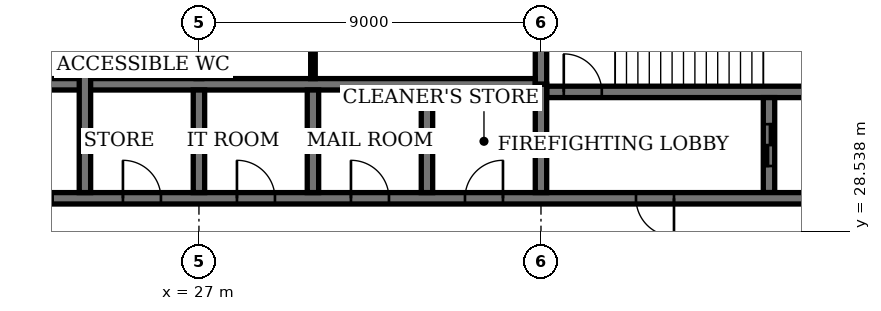
"""IFC4 building model, lengths in metres.
Left out: names, types, materials, properties, quantities, classifications, styles, units other than length and angle.
Written with IfcOpenShell. Run it as: python <this file> out.ifc"""

import sys

from ifc_helpers import new_model, si_unit, direction, frame, frame_2d, origin, place, context, subcontext, project, spatial, rectangle, extrude, element, fill, save


model = new_model("IFC4")
c1 = context("Model", 3, precision=1e-05, world=origin(), true_north=direction((0.0, 1.0)))
c2 = subcontext(c1, "Body", "Model", "MODEL_VIEW")
j1 = project(units=[si_unit("LENGTHUNIT", "METRE"), si_unit("PLANEANGLEUNIT", "RADIAN")], contexts=[c1])
p1 = place(None, origin())
s1 = spatial("IfcSite", under=j1, at=p1, CompositionType="ELEMENT")
p2 = place(p1, origin())
s2 = spatial("IfcBuilding", under=s1, at=p2, CompositionType="ELEMENT")
p3 = place(p2, frame((0.0, 0.0, 243.4)))
s3 = spatial("IfcBuildingStorey", under=s2, at=p3, CompositionType="ELEMENT", Elevation=243.4)
p4 = place(p3, frame((36.15, 32.2, 0.0), z_axis=(0.0, 0.0, 1.0), x_axis=(1.0, 0.0, 0.0)))
e1 = element("IfcWall", 1, at=p4, inside=s3, PredefinedType="SHEAR", context=c2, shape_type="SweptSolid", body=[
    extrude(rectangle(XDim=8.3, YDim=0.3, at=frame_2d((4.15, 0.0))), origin(), (0.0, 0.0, 1.0), 4.0),
])
p5 = place(p4, frame((0.45, 0.0, 0.0)))
e2 = element("IfcOpeningElement", 2, at=p5, cuts=e1, PredefinedType="OPENING", context=c2, shape_type="SweptSolid", body=[
    extrude(rectangle(XDim=1.0, YDim=2.4, at=frame_2d((0.5, 1.2))), frame((0.0, 0.16, 0.0), z_axis=(0.0, -1.0, 0.0), x_axis=(1.0, 0.0, 0.0)), (0.0, 0.0, 1.0), 0.32),
])
p6 = place(p3, frame((36.0, 32.4, 0.0), z_axis=(0.0, 0.0, 1.0), x_axis=(0.0, 1.0, 0.0)))
e3 = element("IfcWall", 3, at=p6, inside=s3, PredefinedType="SHEAR", context=c2, shape_type="SweptSolid", body=[
    extrude(rectangle(XDim=3.05, YDim=0.3, at=frame_2d((1.525, 0.0))), origin(), (0.0, 0.0, 1.0), 4.0),
])
p7 = place(p3, frame((42.0, 29.55, 0.0), z_axis=(0.0, 0.0, 1.0), x_axis=(0.0, 1.0, 0.0)))
e4 = element("IfcWall", 4, at=p7, inside=s3, PredefinedType="SHEAR", context=c2, shape_type="SweptSolid", body=[
    extrude(rectangle(XDim=2.5, YDim=0.3, at=frame_2d((1.25, 0.0))), origin(), (0.0, 0.0, 1.0), 4.0),
])
p8 = place(p7, frame((0.7, 0.0, 0.0)))
e5 = element("IfcOpeningElement", 5, at=p8, cuts=e4, PredefinedType="OPENING", context=c2, shape_type="SweptSolid", body=[
    extrude(rectangle(XDim=1.1, YDim=2.4, at=frame_2d((0.55, 1.2))), frame((0.0, 0.16, 0.0), z_axis=(0.0, -1.0, 0.0), x_axis=(1.0, 0.0, 0.0)), (0.0, 0.0, 1.0), 0.32),
])
p9 = place(p3, frame((18.55, 29.4, 0.0), z_axis=(0.0, 0.0, 1.0), x_axis=(1.0, 0.0, 0.0)))
e6 = element("IfcWall", 6, at=p9, inside=s3, PredefinedType="SHEAR", context=c2, shape_type="SweptSolid", body=[
    extrude(rectangle(XDim=25.9, YDim=0.3, at=frame_2d((12.95, 0.0))), origin(), (0.0, 0.0, 1.0), 4.0),
])
p10 = place(p9, frame((19.95, 0.0, 0.0)))
e7 = element("IfcOpeningElement", 7, at=p10, cuts=e6, PredefinedType="OPENING", context=c2, shape_type="SweptSolid", body=[
    extrude(rectangle(XDim=1.0, YDim=2.4, at=frame_2d((0.5, 1.2))), frame((0.0, 0.16, 0.0), z_axis=(0.0, -1.0, 0.0), x_axis=(1.0, 0.0, 0.0)), (0.0, 0.0, 1.0), 0.32),
])
p11 = place(p9, frame((0.5, 0.0, 0.0)))
e8 = element("IfcOpeningElement", 8, at=p11, cuts=e6, PredefinedType="OPENING", context=c2, shape_type="SweptSolid", body=[
    extrude(rectangle(XDim=0.9, YDim=2.1, at=frame_2d((0.45, 1.05))), frame((0.0, 0.16, 0.0), z_axis=(0.0, -1.0, 0.0), x_axis=(1.0, 0.0, 0.0)), (0.0, 0.0, 1.0), 0.32),
])
p12 = place(p9, frame((15.45, 0.0, 0.0)))
e9 = element("IfcOpeningElement", 9, at=p12, cuts=e6, PredefinedType="OPENING", context=c2, shape_type="SweptSolid", body=[
    extrude(rectangle(XDim=1.0, YDim=2.4, at=frame_2d((0.5, 1.2))), frame((0.0, 0.16, 0.0), z_axis=(0.0, -1.0, 0.0), x_axis=(1.0, 0.0, 0.0)), (0.0, 0.0, 1.0), 0.32),
])
p13 = place(p9, frame((12.45, 0.0, 0.0)))
e10 = element("IfcOpeningElement", 10, at=p13, cuts=e6, PredefinedType="OPENING", context=c2, shape_type="SweptSolid", body=[
    extrude(rectangle(XDim=1.0, YDim=2.4, at=frame_2d((0.5, 1.2))), frame((0.0, 0.16, 0.0), z_axis=(0.0, -1.0, 0.0), x_axis=(1.0, 0.0, 0.0)), (0.0, 0.0, 1.0), 0.32),
])
p14 = place(p9, frame((9.45, 0.0, 0.0)))
e11 = element("IfcOpeningElement", 11, at=p14, cuts=e6, PredefinedType="OPENING", context=c2, shape_type="SweptSolid", body=[
    extrude(rectangle(XDim=1.0, YDim=2.4, at=frame_2d((0.5, 1.2))), frame((0.0, 0.16, 0.0), z_axis=(0.0, -1.0, 0.0), x_axis=(1.0, 0.0, 0.0)), (0.0, 0.0, 1.0), 0.32),
])
p15 = place(p9, frame((6.45, 0.0, 0.0)))
e12 = element("IfcOpeningElement", 12, at=p15, cuts=e6, PredefinedType="OPENING", context=c2, shape_type="SweptSolid", body=[
    extrude(rectangle(XDim=1.0, YDim=2.4, at=frame_2d((0.5, 1.2))), frame((0.0, 0.16, 0.0), z_axis=(0.0, -1.0, 0.0), x_axis=(1.0, 0.0, 0.0)), (0.0, 0.0, 1.0), 0.32),
])
p16 = place(p9, frame((3.3, 0.0, 0.0)))
e13 = element("IfcOpeningElement", 13, at=p16, cuts=e6, PredefinedType="OPENING", context=c2, shape_type="SweptSolid", body=[
    extrude(rectangle(XDim=1.3, YDim=2.4, at=frame_2d((0.65, 1.2))), frame((0.0, 0.16, 0.0), z_axis=(0.0, -1.0, 0.0), x_axis=(1.0, 0.0, 0.0)), (0.0, 0.0, 1.0), 0.32),
])
p17 = place(p3, frame((18.55, 32.4, 0.0), z_axis=(0.0, 0.0, 1.0), x_axis=(1.0, 0.0, 0.0)))
e14 = element("IfcWall", 14, at=p17, inside=s3, PredefinedType="SHEAR", context=c2, shape_type="SweptSolid", body=[
    extrude(rectangle(XDim=17.3, YDim=0.3, at=frame_2d((8.65, 0.0))), origin(), (0.0, 0.0, 1.0), 4.0),
])
for number, where, z_axis, x_axis in (
    (15, (33.0, 29.55, 0.0), (0.0, 0.0, 1.0), (0.0, 1.0, 0.0)),
    (16, (30.0, 29.55, 0.0), (0.0, 0.0, 1.0), (0.0, 1.0, 0.0)),
    (17, (27.0, 29.55, 0.0), (0.0, 0.0, 1.0), (0.0, 1.0, 0.0)),
):
    element("IfcWall", number, at=place(p3, frame(where, z_axis=z_axis, x_axis=x_axis)), inside=s3, PredefinedType="SHEAR", context=c2, shape_type="SweptSolid", body=[
        extrude(rectangle(XDim=2.7, YDim=0.3, at=frame_2d((1.35, 0.0))), origin(), (0.0, 0.0, 1.0), 4.0),
    ])
p18 = place(p3, frame((24.0, 29.55, 0.0), z_axis=(0.0, 0.0, 1.0), x_axis=(0.0, 1.0, 0.0)))
e18 = element("IfcWall", 18, at=p18, inside=s3, PredefinedType="SHEAR", context=c2, shape_type="SweptSolid", body=[
    extrude(rectangle(XDim=5.9, YDim=0.3, at=frame_2d((2.95, 0.0))), origin(), (0.0, 0.0, 1.0), 4.0),
])
p19 = place(p3, frame((36.0, 29.55, 0.0), z_axis=(0.0, 0.0, 1.0), x_axis=(0.0, 1.0, 0.0)))
e19 = element("IfcWall", 19, at=p19, inside=s3, PredefinedType="SHEAR", context=c2, shape_type="SweptSolid", body=[
    extrude(rectangle(XDim=2.85, YDim=0.3, at=frame_2d((1.425, 0.0))), origin(), (0.0, 0.0, 1.0), 4.0),
])
p20 = place(p3, frame((30.0, 32.55, 0.0), z_axis=(0.0, 0.0, 1.0), x_axis=(0.0, 1.0, 0.0)))
e20 = element("IfcWall", 20, at=p20, inside=s3, PredefinedType="PARTITIONING", context=c2, shape_type="SweptSolid", body=[
    extrude(rectangle(XDim=2.9, YDim=0.12, at=frame_2d((1.45, 0.0))), origin(), (0.0, 0.0, 1.0), 3.75),
])
p21 = place(p3, frame((27.0, 32.55, 0.0), z_axis=(0.0, 0.0, 1.0), x_axis=(0.0, 1.0, 0.0)))
e21 = element("IfcWall", 21, at=p21, inside=s3, PredefinedType="PARTITIONING", context=c2, shape_type="SweptSolid", body=[
    extrude(rectangle(XDim=2.9, YDim=0.15, at=frame_2d((1.45, 0.0))), origin(), (0.0, 0.0, 1.0), 3.75),
])
p22 = place(p5, origin())
e22 = element("IfcDoor", 22, at=p22, inside=s3, OperationType="SINGLE_SWING_RIGHT", PredefinedType="DOOR", context=c2, shape_type="SweptSolid", body=[
    extrude(rectangle(XDim=1.0, YDim=2.4, at=frame_2d((0.5, 1.2))), frame((0.0, 0.03, 0.0), z_axis=(0.0, -1.0, 0.0), x_axis=(1.0, 0.0, 0.0)), (0.0, 0.0, 1.0), 0.06),
])
fill(e2, e22)
p23 = place(p10, origin())
e23 = element("IfcDoor", 23, at=p23, inside=s3, OperationType="SINGLE_SWING_RIGHT", PredefinedType="DOOR", context=c2, shape_type="SweptSolid", body=[
    extrude(rectangle(XDim=1.0, YDim=2.4, at=frame_2d((0.5, 1.2))), frame((0.0, 0.03, 0.0), z_axis=(0.0, -1.0, 0.0), x_axis=(1.0, 0.0, 0.0)), (0.0, 0.0, 1.0), 0.06),
])
fill(e7, e23)
p24 = place(p12, origin())
e24 = element("IfcDoor", 24, at=p24, inside=s3, OperationType="SINGLE_SWING_LEFT", PredefinedType="DOOR", context=c2, shape_type="SweptSolid", body=[
    extrude(rectangle(XDim=1.0, YDim=2.4, at=frame_2d((0.5, 1.2))), frame((0.0, 0.03, 0.0), z_axis=(0.0, -1.0, 0.0), x_axis=(1.0, 0.0, 0.0)), (0.0, 0.0, 1.0), 0.06),
])
fill(e9, e24)
p25 = place(p13, origin())
e25 = element("IfcDoor", 25, at=p25, inside=s3, OperationType="SINGLE_SWING_RIGHT", PredefinedType="DOOR", context=c2, shape_type="SweptSolid", body=[
    extrude(rectangle(XDim=1.0, YDim=2.4, at=frame_2d((0.5, 1.2))), frame((0.0, 0.03, 0.0), z_axis=(0.0, -1.0, 0.0), x_axis=(1.0, 0.0, 0.0)), (0.0, 0.0, 1.0), 0.06),
])
fill(e10, e25)
p26 = place(p14, origin())
e26 = element("IfcDoor", 26, at=p26, inside=s3, OperationType="SINGLE_SWING_RIGHT", PredefinedType="DOOR", context=c2, shape_type="SweptSolid", body=[
    extrude(rectangle(XDim=1.0, YDim=2.4, at=frame_2d((0.5, 1.2))), frame((0.0, 0.03, 0.0), z_axis=(0.0, -1.0, 0.0), x_axis=(1.0, 0.0, 0.0)), (0.0, 0.0, 1.0), 0.06),
])
fill(e11, e26)
p27 = place(p15, origin())
e27 = element("IfcDoor", 27, at=p27, inside=s3, OperationType="SINGLE_SWING_RIGHT", PredefinedType="DOOR", context=c2, shape_type="SweptSolid", body=[
    extrude(rectangle(XDim=1.0, YDim=2.4, at=frame_2d((0.5, 1.2))), frame((0.0, 0.03, 0.0), z_axis=(0.0, -1.0, 0.0), x_axis=(1.0, 0.0, 0.0)), (0.0, 0.0, 1.0), 0.06),
])
fill(e12, e27)
p28 = place(p16, origin())
e28 = element("IfcDoor", 28, at=p28, inside=s3, OperationType="DOUBLE_DOOR_SLIDING", PredefinedType="DOOR", context=c2, shape_type="SweptSolid", body=[
    extrude(rectangle(XDim=1.3, YDim=2.4, at=frame_2d((0.65, 1.2))), frame((0.0, 0.02, 0.0), z_axis=(0.0, -1.0, 0.0), x_axis=(1.0, 0.0, 0.0)), (0.0, 0.0, 1.0), 0.04),
])
fill(e13, e28)
p29 = place(p8, origin())
e29 = element("IfcDoor", 29, at=p29, inside=s3, OperationType="DOUBLE_DOOR_SLIDING", PredefinedType="DOOR", context=c2, shape_type="SweptSolid", body=[
    extrude(rectangle(XDim=1.1, YDim=2.4, at=frame_2d((0.55, 1.2))), frame((0.0, 0.03, 0.0), z_axis=(0.0, -1.0, 0.0), x_axis=(1.0, 0.0, 0.0)), (0.0, 0.0, 1.0), 0.06),
])
fill(e5, e29)
save(model, sys.argv[1])
